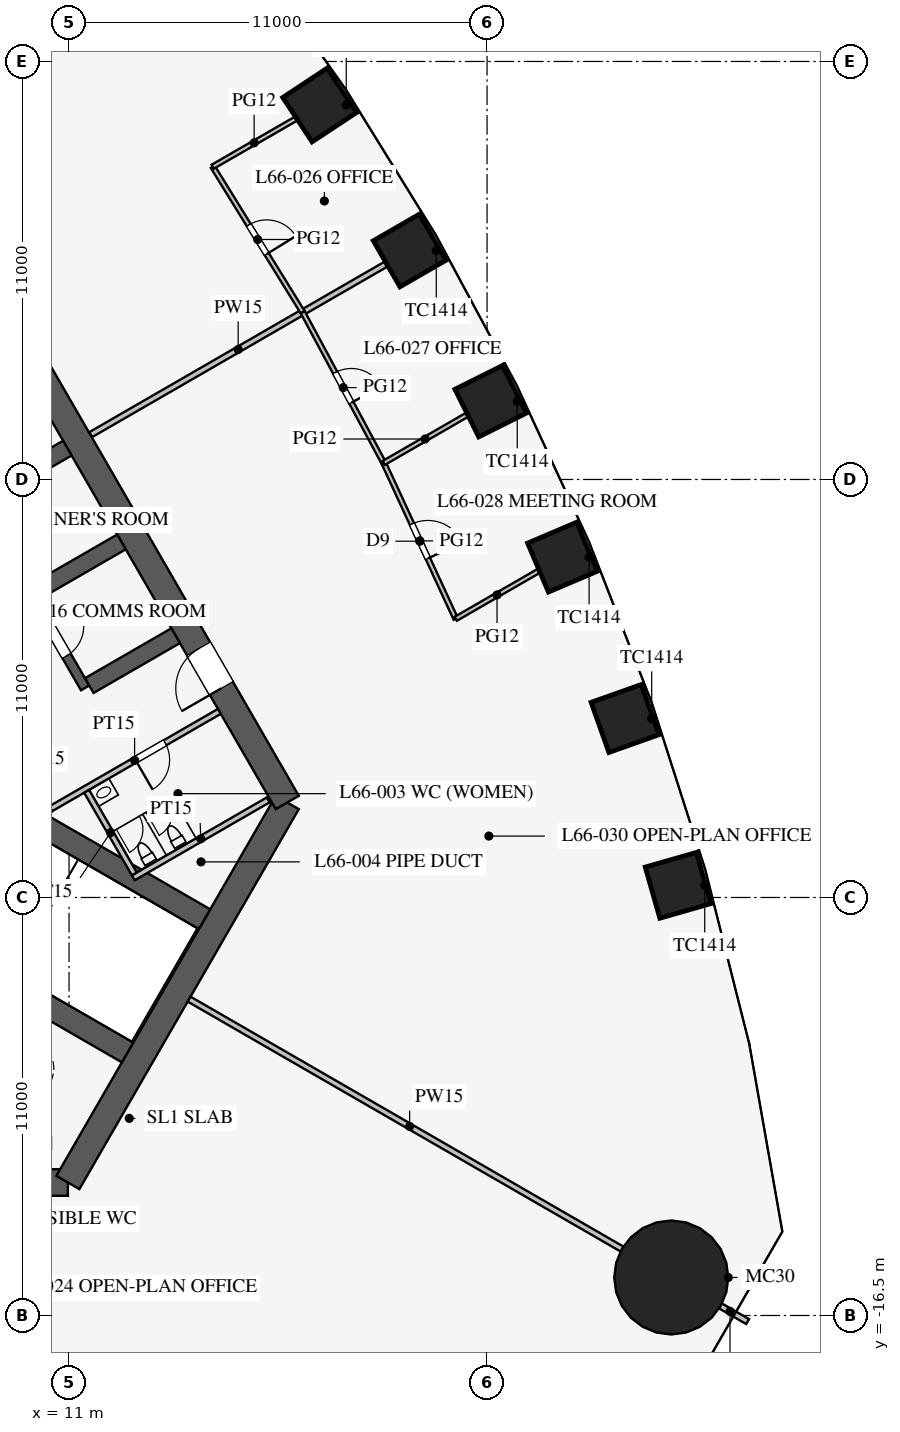
"""IFC4 building model, lengths in metres.
Left out: names, types, materials, properties, quantities, classifications, styles, units other than length and angle.
Written with IfcOpenShell. Run it as: python <this file> out.ifc"""

import sys

from ifc_helpers import new_model, si_unit, direction, frame, frame_2d, origin, origin_2d, place, context, subcontext, project, spatial, rectangle, circle, extrude, element, fill, save


model = new_model("IFC4")
c1 = context("Model", 3, precision=1e-05, world=origin(), true_north=direction((0.0, 1.0)))
c2 = subcontext(c1, "Body", "Model", "MODEL_VIEW")
j1 = project(units=[si_unit("LENGTHUNIT", "METRE"), si_unit("PLANEANGLEUNIT", "RADIAN")], contexts=[c1])
p1 = place(None, origin())
s1 = spatial("IfcSite", under=j1, at=p1, CompositionType="ELEMENT")
p2 = place(p1, origin())
s2 = spatial("IfcBuilding", under=s1, at=p2, CompositionType="ELEMENT")
p3 = place(p2, frame((0.0, 0.0, 288.9)))
s3 = spatial("IfcBuildingStorey", under=s2, at=p3, CompositionType="ELEMENT", Elevation=288.9)
for number, where, z_axis, x_axis in (
    (1, (27.027, -5.18, 0.0), (0.0, 0.0, 1.0), (-0.275, 0.961, 0.0)),
    (2, (25.632, -0.79, 0.0), (0.0, 0.0, 1.0), (-0.334, 0.942, 0.0)),
    (3, (23.985, 3.455, 0.0), (0.0, 0.0, 1.0), (-0.391, 0.92, 0.0)),
    (4, (22.094, 7.56, 0.0), (0.0, 0.0, 1.0), (-0.447, 0.895, 0.0)),
    (5, (19.963, 11.526, 0.0), (0.0, 0.0, 1.0), (-0.5, 0.866, 0.0)),
    (6, (17.594, 15.354, 0.0), (0.0, 0.0, 1.0), (-0.552, 0.834, 0.0)),
):
    element("IfcColumn", number, at=place(p3, frame(where, z_axis=z_axis, x_axis=x_axis)), inside=s3, PredefinedType="COLUMN", context=c2, shape_type="SweptSolid", body=[
        extrude(rectangle(XDim=1.4, YDim=1.4, at=origin_2d()), origin(), (0.0, 0.0, 1.0), 4.2),
    ])
p4 = place(p3, frame((26.847, -15.5, 0.0), z_axis=(0.0, 0.0, 1.0), x_axis=(1.0, 0.0, 0.0)))
e7 = element("IfcColumn", 7, at=p4, inside=s3, PredefinedType="COLUMN", context=c2, shape_type="SweptSolid", body=[
    extrude(circle(Radius=1.5, at=origin_2d()), origin(), (0.0, 0.0, 1.0), 4.2),
])
p5 = place(p3, frame((-10.97, -13.0, 0.0), z_axis=(0.0, 0.0, 1.0), x_axis=(1.0, 0.0, 0.0)))
e8 = element("IfcWall", 8, at=p5, inside=s3, PredefinedType="SHEAR", context=c2, shape_type="SweptSolid", body=[
    extrude(rectangle(XDim=21.939, YDim=0.7, at=frame_2d((10.97, 0.0))), origin(), (0.0, 0.0, 1.0), 4.2),
])
p6 = place(p5, frame((17.27, 0.0, 0.0)))
e9 = element("IfcOpeningElement", 9, at=p6, cuts=e8, PredefinedType="OPENING", context=c2, shape_type="SweptSolid", body=[
    extrude(rectangle(XDim=1.2, YDim=2.1, at=frame_2d((0.6, 1.05))), frame((0.0, 0.36, 0.0), z_axis=(0.0, -1.0, 0.0), x_axis=(1.0, 0.0, 0.0)), (0.0, 0.0, 1.0), 0.72),
])
p7 = place(p5, frame((3.47, 0.0, 0.0)))
e10 = element("IfcOpeningElement", 10, at=p7, cuts=e8, PredefinedType="OPENING", context=c2, shape_type="SweptSolid", body=[
    extrude(rectangle(XDim=1.2, YDim=2.1, at=frame_2d((0.6, 1.05))), frame((0.0, 0.36, 0.0), z_axis=(0.0, -1.0, 0.0), x_axis=(1.0, 0.0, 0.0)), (0.0, 0.0, 1.0), 0.72),
])
p8 = place(p3, frame((10.97, -13.0, 0.0), z_axis=(0.0, 0.0, 1.0), x_axis=(0.499995765644, 0.866027848477, 0.0)))
e11 = element("IfcWall", 11, at=p8, inside=s3, PredefinedType="SHEAR", context=c2, shape_type="SweptSolid", body=[
    extrude(rectangle(XDim=11.547, YDim=0.7, at=frame_2d((5.773, 0.0))), origin(), (0.0, 0.0, 1.0), 4.2),
])
p9 = place(p3, frame((16.743, -3.0, 0.0), z_axis=(0.0, 0.0, 1.0), x_axis=(-0.500002442456, 0.866023993627, 0.0)))
e12 = element("IfcWall", 12, at=p9, inside=s3, PredefinedType="SHEAR", context=c2, shape_type="SweptSolid", body=[
    extrude(rectangle(XDim=21.939, YDim=0.7, at=frame_2d((10.97, 0.0))), origin(), (0.0, 0.0, 1.0), 4.2),
])
p10 = place(p9, frame((17.27, 0.0, 0.0)))
e13 = element("IfcOpeningElement", 13, at=p10, cuts=e12, PredefinedType="OPENING", context=c2, shape_type="SweptSolid", body=[
    extrude(rectangle(XDim=1.2, YDim=2.1, at=frame_2d((0.6, 1.05))), frame((0.0, 0.36, 0.0), z_axis=(0.0, -1.0, 0.0), x_axis=(1.0, 0.0, 0.0)), (0.0, 0.0, 1.0), 0.72),
])
p11 = place(p9, frame((3.47, 0.0, 0.0)))
e14 = element("IfcOpeningElement", 14, at=p11, cuts=e12, PredefinedType="OPENING", context=c2, shape_type="SweptSolid", body=[
    extrude(rectangle(XDim=1.2, YDim=2.1, at=frame_2d((0.6, 1.05))), frame((0.0, 0.36, 0.0), z_axis=(0.0, -1.0, 0.0), x_axis=(1.0, 0.0, 0.0)), (0.0, 0.0, 1.0), 0.72),
])
p12 = place(p3, frame((11.424, 0.014, 0.0), z_axis=(0.0, 0.0, 1.0), x_axis=(-0.500001763848, 0.866024385424, 0.0)))
e15 = element("IfcWall", 15, at=p12, inside=s3, PredefinedType="SHEAR", context=c2, shape_type="SweptSolid", body=[
    extrude(rectangle(XDim=11.4, YDim=0.25, at=frame_2d((5.7, 0.0))), origin(), (0.0, 0.0, 1.0), 4.2),
])
p13 = place(p12, frame((0.975, 0.0, 0.0)))
e16 = element("IfcOpeningElement", 16, at=p13, cuts=e15, PredefinedType="OPENING", context=c2, shape_type="SweptSolid", body=[
    extrude(rectangle(XDim=0.9, YDim=2.1, at=frame_2d((0.45, 1.05))), frame((0.0, 0.135, 0.0), z_axis=(0.0, -1.0, 0.0), x_axis=(1.0, 0.0, 0.0)), (0.0, 0.0, 1.0), 0.27),
])
p14 = place(p12, frame((3.825, 0.0, 0.0)))
e17 = element("IfcOpeningElement", 17, at=p14, cuts=e15, PredefinedType="OPENING", context=c2, shape_type="SweptSolid", body=[
    extrude(rectangle(XDim=0.9, YDim=2.1, at=frame_2d((0.45, 1.05))), frame((0.0, 0.135, 0.0), z_axis=(0.0, -1.0, 0.0), x_axis=(1.0, 0.0, 0.0)), (0.0, 0.0, 1.0), 0.27),
])
p15 = place(p12, frame((6.675, 0.0, 0.0)))
e18 = element("IfcOpeningElement", 18, at=p15, cuts=e15, PredefinedType="OPENING", context=c2, shape_type="SweptSolid", body=[
    extrude(rectangle(XDim=0.9, YDim=2.1, at=frame_2d((0.45, 1.05))), frame((0.0, 0.135, 0.0), z_axis=(0.0, -1.0, 0.0), x_axis=(1.0, 0.0, 0.0)), (0.0, 0.0, 1.0), 0.27),
])
p16 = place(p12, frame((9.525, 0.0, 0.0)))
e19 = element("IfcOpeningElement", 19, at=p16, cuts=e15, PredefinedType="OPENING", context=c2, shape_type="SweptSolid", body=[
    extrude(rectangle(XDim=0.9, YDim=2.1, at=frame_2d((0.45, 1.05))), frame((0.0, 0.135, 0.0), z_axis=(0.0, -1.0, 0.0), x_axis=(1.0, 0.0, 0.0)), (0.0, 0.0, 1.0), 0.27),
])
for number, where, z_axis, x_axis in (
    (20, (11.532, 0.076, 0.0), (0.0, 0.0, 1.0), (0.866, 0.5, 0.0)),
    (21, (10.107, 2.544, 0.0), (0.0, 0.0, 1.0), (0.866, 0.5, 0.0)),
    (22, (8.682, 5.012, 0.0), (0.0, 0.0, 1.0), (0.866, 0.5, 0.0)),
):
    element("IfcWall", number, at=place(p3, frame(where, z_axis=z_axis, x_axis=x_axis)), inside=s3, PredefinedType="SHEAR", context=c2, shape_type="SweptSolid", body=[
        extrude(rectangle(XDim=2.625, YDim=0.45, at=frame_2d((1.312, 0.0))), origin(), (0.0, 0.0, 1.0), 4.2),
    ])
for number, where, z_axis, x_axis in (
    (23, (4.638, -5.016, 0.0), (0.0, 0.0, 1.0), (0.866, -0.5, 0.0)),
    (24, (6.663, -1.509, 0.0), (0.0, 0.0, 1.0), (0.866, -0.5, 0.0)),
):
    element("IfcWall", number, at=place(p3, frame(where, z_axis=z_axis, x_axis=x_axis)), inside=s3, PredefinedType="SHEAR", context=c2, shape_type="SweptSolid", body=[
        extrude(rectangle(XDim=9.125, YDim=0.6, at=frame_2d((4.562, 0.0))), origin(), (0.0, 0.0, 1.0), 4.2),
    ])
p17 = place(p3, frame((10.495, -3.178, 0.0), z_axis=(0.0, 0.0, 1.0), x_axis=(0.866037967349, 0.499978238636, 0.0)))
e25 = element("IfcWall", 25, at=p17, inside=s3, PredefinedType="PARTITIONING", context=c2, shape_type="SweptSolid", body=[
    extrude(rectangle(XDim=5.15, YDim=0.15, at=frame_2d((2.575, 0.0))), origin(), (0.0, 0.0, 1.0), 4.0),
])
p18 = place(p17, frame((2.6, 0.0, 0.0)))
e26 = element("IfcOpeningElement", 26, at=p18, cuts=e25, PredefinedType="OPENING", context=c2, shape_type="SweptSolid", body=[
    extrude(rectangle(XDim=0.9, YDim=2.1, at=frame_2d((0.45, 1.05))), frame((0.0, 0.085, 0.0), z_axis=(0.0, -1.0, 0.0), x_axis=(1.0, 0.0, 0.0)), (0.0, 0.0, 1.0), 0.17),
])
p19 = place(p3, frame((12.691, -4.982, 0.0), z_axis=(0.0, 0.0, 1.0), x_axis=(0.8660249478, 0.500000789788, 0.0)))
e27 = element("IfcWall", 27, at=p19, inside=s3, PredefinedType="PARTITIONING", context=c2, shape_type="SweptSolid", body=[
    extrude(rectangle(XDim=4.1, YDim=0.15, at=frame_2d((2.05, 0.0))), origin(), (0.0, 0.0, 1.0), 4.0),
])
p20 = place(p3, frame((11.464, -2.706, 0.0), z_axis=(0.0, 0.0, 1.0), x_axis=(0.50001992892, -0.866013897511, 0.0)))
e28 = element("IfcWall", 28, at=p20, inside=s3, PredefinedType="PARTITIONING", context=c2, shape_type="SweptSolid", body=[
    extrude(rectangle(XDim=2.51, YDim=0.15, at=frame_2d((1.255, 0.0))), origin(), (0.0, 0.0, 1.0), 4.0),
])
p21 = place(p3, frame((14.159, -8.175, 0.0), z_axis=(0.0, 0.0, 1.0), x_axis=(0.866026905467, -0.499997399001, 0.0)))
e29 = element("IfcWall", 29, at=p21, inside=s3, PredefinedType="PARTITIONING", context=c2, shape_type="SweptSolid", body=[
    extrude(rectangle(XDim=13.4, YDim=0.15, at=frame_2d((6.7, 0.0))), origin(), (0.0, 0.0, 1.0), 2.5),
])
p22 = place(p3, frame((27.929, -16.125, 0.0), z_axis=(0.0, 0.0, 1.0), x_axis=(0.866086810508, -0.499893625349, 0.0)))
e30 = element("IfcWall", 30, at=p22, inside=s3, PredefinedType="PARTITIONING", context=c2, shape_type="SweptSolid", body=[
    extrude(rectangle(XDim=1.07, YDim=0.15, at=frame_2d((0.535, 0.0))), origin(), (0.0, 0.0, 1.0), 2.5),
])
p23 = place(p3, frame((11.57, 6.68, 0.0), z_axis=(0.0, 0.0, 1.0), x_axis=(0.866018180823, 0.500012510328, 0.0)))
e31 = element("IfcWall", 31, at=p23, inside=s3, PredefinedType="PARTITIONING", context=c2, shape_type="SweptSolid", body=[
    extrude(rectangle(XDim=8.962, YDim=0.15, at=frame_2d((4.481, 0.0))), origin(), (0.0, 0.0, 1.0), 3.3),
])
p24 = place(p3, frame((17.149, 9.901, 0.0), z_axis=(0.0, 0.0, 1.0), x_axis=(-0.525981173851, 0.850496210899, 0.0)))
e32 = element("IfcWall", 32, at=p24, inside=s3, PredefinedType="PARTITIONING", context=c2, shape_type="SweptSolid", body=[
    extrude(rectangle(XDim=4.502, YDim=0.12, at=frame_2d((2.251, 0.0))), origin(), (0.0, 0.0, 1.0), 2.9),
])
p25 = place(p24, frame((1.8, 0.0, 0.15)))
e33 = element("IfcOpeningElement", 33, at=p25, cuts=e32, PredefinedType="OPENING", context=c2, shape_type="SweptSolid", body=[
    extrude(rectangle(XDim=0.9, YDim=2.1, at=frame_2d((0.45, 1.05))), frame((0.0, 0.07, 0.0), z_axis=(0.0, -1.0, 0.0), x_axis=(1.0, 0.0, 0.0)), (0.0, 0.0, 1.0), 0.14),
])
p26 = place(p3, frame((19.281, 5.936, 0.0), z_axis=(0.0, 0.0, 1.0), x_axis=(-0.473566170147, 0.880758242932, 0.0)))
e34 = element("IfcWall", 34, at=p26, inside=s3, PredefinedType="PARTITIONING", context=c2, shape_type="SweptSolid", body=[
    extrude(rectangle(XDim=4.502, YDim=0.12, at=frame_2d((2.251, 0.0))), origin(), (0.0, 0.0, 1.0), 2.9),
])
p27 = place(p26, frame((1.8, 0.0, 0.15)))
e35 = element("IfcOpeningElement", 35, at=p27, cuts=e34, PredefinedType="OPENING", context=c2, shape_type="SweptSolid", body=[
    extrude(rectangle(XDim=0.9, YDim=2.1, at=frame_2d((0.45, 1.05))), frame((0.0, 0.07, 0.0), z_axis=(0.0, -1.0, 0.0), x_axis=(1.0, 0.0, 0.0)), (0.0, 0.0, 1.0), 0.14),
])
p28 = place(p3, frame((21.175, 1.833, 0.0), z_axis=(0.0, 0.0, 1.0), x_axis=(-0.419270595022, 0.907861315483, 0.0)))
e36 = element("IfcWall", 36, at=p28, inside=s3, PredefinedType="PARTITIONING", context=c2, shape_type="SweptSolid", body=[
    extrude(rectangle(XDim=4.519, YDim=0.12, at=frame_2d((2.259, 0.0))), origin(), (0.0, 0.0, 1.0), 2.9),
])
p29 = place(p28, frame((1.75, 0.0, 0.15)))
e37 = element("IfcOpeningElement", 37, at=p29, cuts=e36, PredefinedType="OPENING", context=c2, shape_type="SweptSolid", body=[
    extrude(rectangle(XDim=1.0, YDim=2.1, at=frame_2d((0.5, 1.05))), frame((0.0, 0.07, 0.0), z_axis=(0.0, -1.0, 0.0), x_axis=(1.0, 0.0, 0.0)), (0.0, 0.0, 1.0), 0.14),
])
for number, where, z_axis, x_axis in (
    (38, (14.781, 13.73, 0.0), (0.0, 0.0, 1.0), (0.866, 0.5, 0.0)),
    (39, (19.281, 5.936, 0.0), (0.0, 0.0, 1.0), (0.866, 0.5, 0.0)),
):
    element("IfcWall", number, at=place(p3, frame(where, z_axis=z_axis, x_axis=x_axis)), inside=s3, PredefinedType="PARTITIONING", context=c2, shape_type="SweptSolid", body=[
        extrude(rectangle(XDim=2.517, YDim=0.12, at=frame_2d((1.259, 0.0))), origin(), (0.0, 0.0, 1.0), 2.9),
    ])
p30 = place(p3, frame((21.175, 1.833, 0.0), z_axis=(0.0, 0.0, 1.0), x_axis=(0.866042990507, 0.499969537666, 0.0)))
e40 = element("IfcWall", 40, at=p30, inside=s3, PredefinedType="PARTITIONING", context=c2, shape_type="SweptSolid", body=[
    extrude(rectangle(XDim=2.509, YDim=0.12, at=frame_2d((1.254, 0.0))), origin(), (0.0, 0.0, 1.0), 2.9),
])
p31 = place(p18, frame((0.9, 0.0, 0.0), z_axis=(0.0, 0.0, 1.0), x_axis=(-1.0, 0.0, 0.0)))
e41 = element("IfcDoor", 41, at=p31, inside=s3, OperationType="SINGLE_SWING_RIGHT", PredefinedType="DOOR", context=c2, shape_type="SweptSolid", body=[
    extrude(rectangle(XDim=0.9, YDim=2.1, at=frame_2d((0.45, 1.05))), frame((0.0, 0.025, 0.0), z_axis=(0.0, -1.0, 0.0), x_axis=(1.0, 0.0, 0.0)), (0.0, 0.0, 1.0), 0.05),
])
fill(e26, e41)
p32 = place(p11, origin())
e42 = element("IfcDoor", 42, at=p32, inside=s3, OperationType="SINGLE_SWING_LEFT", PredefinedType="DOOR", context=c2, shape_type="SweptSolid", body=[
    extrude(rectangle(XDim=1.2, YDim=2.1, at=frame_2d((0.6, 1.05))), frame((0.0, 0.025, 0.0), z_axis=(0.0, -1.0, 0.0), x_axis=(1.0, 0.0, 0.0)), (0.0, 0.0, 1.0), 0.05),
])
fill(e14, e42)
p33 = place(p13, frame((0.9, 0.0, 0.0), z_axis=(0.0, 0.0, 1.0), x_axis=(-1.0, 0.0, 0.0)))
e43 = element("IfcDoor", 43, at=p33, inside=s3, OperationType="SINGLE_SWING_LEFT", PredefinedType="DOOR", context=c2, shape_type="SweptSolid", body=[
    extrude(rectangle(XDim=0.9, YDim=2.1, at=frame_2d((0.45, 1.05))), frame((0.0, 0.025, 0.0), z_axis=(0.0, -1.0, 0.0), x_axis=(1.0, 0.0, 0.0)), (0.0, 0.0, 1.0), 0.05),
])
fill(e16, e43)
p34 = place(p25, frame((0.9, 0.0, 0.0), z_axis=(0.0, 0.0, 1.0), x_axis=(-1.0, 0.0, 0.0)))
e44 = element("IfcDoor", 44, at=p34, inside=s3, OperationType="SINGLE_SWING_RIGHT", PredefinedType="DOOR", context=c2, shape_type="SweptSolid", body=[
    extrude(rectangle(XDim=0.9, YDim=2.1, at=frame_2d((0.45, 1.05))), frame((0.0, 0.025, 0.0), z_axis=(0.0, -1.0, 0.0), x_axis=(1.0, 0.0, 0.0)), (0.0, 0.0, 1.0), 0.05),
])
fill(e33, e44)
p35 = place(p27, frame((0.9, 0.0, 0.0), z_axis=(0.0, 0.0, 1.0), x_axis=(-1.0, 0.0, 0.0)))
e45 = element("IfcDoor", 45, at=p35, inside=s3, OperationType="SINGLE_SWING_RIGHT", PredefinedType="DOOR", context=c2, shape_type="SweptSolid", body=[
    extrude(rectangle(XDim=0.9, YDim=2.1, at=frame_2d((0.45, 1.05))), frame((0.0, 0.025, 0.0), z_axis=(0.0, -1.0, 0.0), x_axis=(1.0, 0.0, 0.0)), (0.0, 0.0, 1.0), 0.05),
])
fill(e35, e45)
p36 = place(p29, frame((1.0, 0.0, 0.0), z_axis=(0.0, 0.0, 1.0), x_axis=(-1.0, 0.0, 0.0)))
e46 = element("IfcDoor", 46, at=p36, inside=s3, OperationType="SINGLE_SWING_RIGHT", PredefinedType="DOOR", context=c2, shape_type="SweptSolid", body=[
    extrude(rectangle(XDim=1.0, YDim=2.1, at=frame_2d((0.5, 1.05))), frame((0.0, 0.025, 0.0), z_axis=(0.0, -1.0, 0.0), x_axis=(1.0, 0.0, 0.0)), (0.0, 0.0, 1.0), 0.05),
])
fill(e37, e46)
save(model, sys.argv[1])
